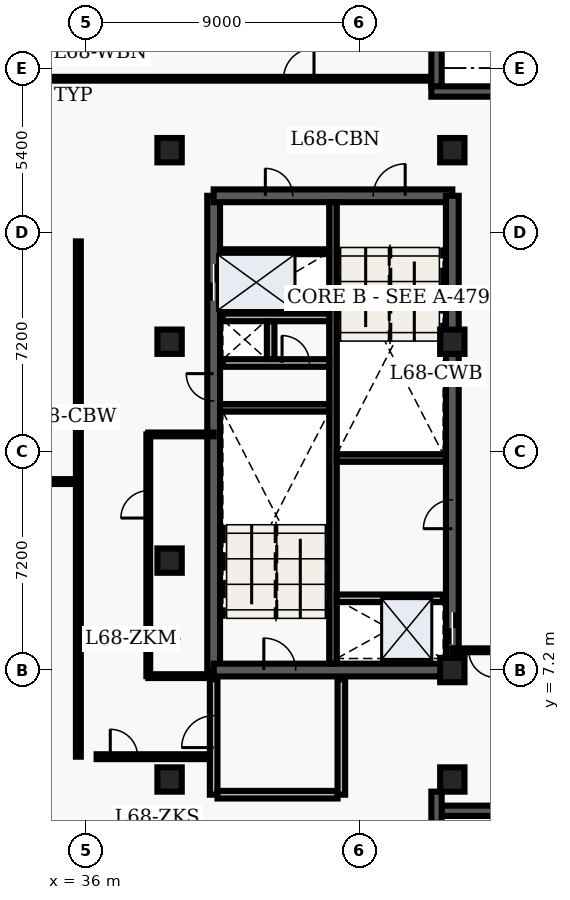
"""IFC4 building model, lengths in metres.
Left out: names, types, materials, properties, quantities, classifications, styles, units other than length and angle.
Written with IfcOpenShell. Run it as: python <this file> out.ifc"""

import sys

from ifc_helpers import new_model, entity, si_unit, converted_unit, direction, frame, origin_with_axes, origin_2d_with_axis, place, context, subcontext, project, spatial, polyline, rectangle, outline, extrude, element, fill, save


model = new_model("IFC4")
c1 = context("Model", 3, precision=1e-05, world=origin_with_axes(), true_north=direction((0.0, 1.0)))
c2 = subcontext(c1, "Body", "Model", "MODEL_VIEW")
j1 = project(units=[si_unit("LENGTHUNIT", "METRE"), converted_unit("PLANEANGLEUNIT", "DEGREE", entity("IfcPlaneAngleMeasure", 0.017), si_unit("PLANEANGLEUNIT", "RADIAN"), dimensions=[0, 0, 0, 0, 0, 0, 0])], contexts=[c1])
p1 = place(None, origin_with_axes())
s1 = spatial("IfcSite", under=j1, at=p1, CompositionType="ELEMENT")
p2 = place(p1, origin_with_axes())
s2 = spatial("IfcBuilding", under=s1, at=p2, CompositionType="ELEMENT")
p3 = place(p2, frame((0.0, 0.0, 276.3), z_axis=(0.0, 0.0, 1.0), x_axis=(1.0, 0.0, 0.0)))
s3 = spatial("IfcBuildingStorey", under=s2, at=p3, CompositionType="ELEMENT", Elevation=276.3)
p4 = place(p3, frame((40.2, 7.2, 0.0), z_axis=(0.0, 0.0, 1.0), x_axis=(0.0, 1.0, 0.0)))
e1 = element("IfcWall", 1, at=p4, inside=s3, PredefinedType="SHEAR", context=c2, shape_type="SweptSolid", body=[
    extrude(outline(polyline([(0.0, -0.21), (15.6, -0.21), (15.6, 0.21), (0.0, 0.21), (0.0, -0.21)])), origin_with_axes(), (0.0, 0.0, 1.0), 3.66),
])
p5 = place(p4, frame((12.75, 0.0, 0.0), z_axis=(0.0, 0.0, 1.0), x_axis=(1.0, 0.0, 0.0)))
e2 = element("IfcOpeningElement", 2, at=p5, cuts=e1, PredefinedType="OPENING", context=c2, shape_type="SweptSolid", body=[
    extrude(rectangle(XDim=1.2, YDim=0.44, at=origin_2d_with_axis()), origin_with_axes(), (0.0, 0.0, 1.0), 2.15),
])
p6 = place(p4, frame((9.3, 0.0, 0.0), z_axis=(0.0, 0.0, 1.0), x_axis=(1.0, 0.0, 0.0)))
e3 = element("IfcOpeningElement", 3, at=p6, cuts=e1, PredefinedType="OPENING", context=c2, shape_type="SweptSolid", body=[
    extrude(rectangle(XDim=0.9, YDim=0.44, at=origin_2d_with_axis()), origin_with_axes(), (0.0, 0.0, 1.0), 2.15),
])
p7 = place(p3, frame((40.2, 7.2, 0.0), z_axis=(0.0, 0.0, 1.0), x_axis=(1.0, 0.0, 0.0)))
e4 = element("IfcWall", 4, at=p7, inside=s3, PredefinedType="SHEAR", context=c2, shape_type="SweptSolid", body=[
    extrude(outline(polyline([(0.0, -0.21), (7.85, -0.21), (7.85, 0.21), (0.0, 0.21), (0.0, -0.21)])), origin_with_axes(), (0.0, 0.0, 1.0), 3.66),
])
p8 = place(p7, frame((2.175, 0.0, 0.0), z_axis=(0.0, 0.0, 1.0), x_axis=(1.0, 0.0, 0.0)))
e5 = element("IfcOpeningElement", 5, at=p8, cuts=e4, PredefinedType="OPENING", context=c2, shape_type="SweptSolid", body=[
    extrude(rectangle(XDim=1.05, YDim=0.44, at=origin_2d_with_axis()), origin_with_axes(), (0.0, 0.0, 1.0), 2.15),
])
p9 = place(p3, frame((40.2, 22.8, 0.0), z_axis=(0.0, 0.0, 1.0), x_axis=(1.0, 0.0, 0.0)))
e6 = element("IfcWall", 6, at=p9, inside=s3, PredefinedType="SHEAR", context=c2, shape_type="SweptSolid", body=[
    extrude(outline(polyline([(0.0, -0.21), (7.85, -0.21), (7.85, 0.21), (0.0, 0.21), (0.0, -0.21)])), origin_with_axes(), (0.0, 0.0, 1.0), 3.66),
])
p10 = place(p9, frame((5.775, 0.0, 0.0), z_axis=(0.0, 0.0, 1.0), x_axis=(1.0, 0.0, 0.0)))
e7 = element("IfcOpeningElement", 7, at=p10, cuts=e6, PredefinedType="OPENING", context=c2, shape_type="SweptSolid", body=[
    extrude(rectangle(XDim=1.05, YDim=0.44, at=origin_2d_with_axis()), origin_with_axes(), (0.0, 0.0, 1.0), 2.15),
])
p11 = place(p9, frame((2.15, 0.0, 0.0), z_axis=(0.0, 0.0, 1.0), x_axis=(1.0, 0.0, 0.0)))
e8 = element("IfcOpeningElement", 8, at=p11, cuts=e6, PredefinedType="OPENING", context=c2, shape_type="SweptSolid", body=[
    extrude(rectangle(XDim=0.9, YDim=0.44, at=origin_2d_with_axis()), origin_with_axes(), (0.0, 0.0, 1.0), 2.15),
])
p12 = place(p3, frame((48.05, 7.2, 0.0), z_axis=(0.0, 0.0, 1.0), x_axis=(0.0, 1.0, 0.0)))
e9 = element("IfcWall", 9, at=p12, inside=s3, PredefinedType="SHEAR", context=c2, shape_type="SweptSolid", body=[
    extrude(outline(polyline([(0.0, -0.21), (15.6, -0.21), (15.6, 0.21), (0.0, 0.21), (0.0, -0.21)])), origin_with_axes(), (0.0, 0.0, 1.0), 3.66),
])
p13 = place(p12, frame((1.375, 0.0, 0.0), z_axis=(0.0, 0.0, 1.0), x_axis=(1.0, 0.0, 0.0)))
e10 = element("IfcOpeningElement", 10, at=p13, cuts=e9, PredefinedType="OPENING", context=c2, shape_type="SweptSolid", body=[
    extrude(rectangle(XDim=1.05, YDim=0.44, at=origin_2d_with_axis()), origin_with_axes(), (0.0, 0.0, 1.0), 2.15),
])
p14 = place(p12, frame((5.125, 0.0, 0.0), z_axis=(0.0, 0.0, 1.0), x_axis=(1.0, 0.0, 0.0)))
e11 = element("IfcOpeningElement", 11, at=p14, cuts=e9, PredefinedType="OPENING", context=c2, shape_type="SweptSolid", body=[
    extrude(rectangle(XDim=0.95, YDim=0.44, at=origin_2d_with_axis()), origin_with_axes(), (0.0, 0.0, 1.0), 2.15),
])
p15 = place(p3, frame((44.125, 7.41, 0.0), z_axis=(0.0, 0.0, 1.0), x_axis=(0.0, 1.0, 0.0)))
e12 = element("IfcWall", 12, at=p15, inside=s3, PredefinedType="SHEAR", context=c2, shape_type="SweptSolid", body=[
    extrude(outline(polyline([(0.0, -0.125), (15.18, -0.125), (15.18, 0.125), (0.0, 0.125), (0.0, -0.125)])), origin_with_axes(), (0.0, 0.0, 1.0), 3.66),
])
for number, where, z_axis, x_axis in (
    (13, (40.41, 15.825, 0.0), (0.0, 0.0, 1.0), (1.0, 0.0, 0.0)),
    (14, (44.25, 14.175, 0.0), (0.0, 0.0, 1.0), (1.0, 0.0, 0.0)),
):
    element("IfcWall", number, at=place(p3, frame(where, z_axis=z_axis, x_axis=x_axis)), inside=s3, PredefinedType="SHEAR", context=c2, shape_type="SweptSolid", body=[
        extrude(outline(polyline([(0.0, -0.125), (3.59, -0.125), (3.59, 0.125), (0.0, 0.125), (0.0, -0.125)])), origin_with_axes(), (0.0, 0.0, 1.0), 3.66),
    ])
p16 = place(p3, frame((40.5, 17.3, 0.0), z_axis=(0.0, 0.0, 1.0), x_axis=(1.0, 0.0, 0.0)))
e15 = element("IfcWall", 15, at=p16, inside=s3, PredefinedType="SOLIDWALL", context=c2, shape_type="SweptSolid", body=[
    extrude(outline(polyline([(0.0, -0.125), (3.5, -0.125), (3.5, 0.125), (0.0, 0.125), (0.0, -0.125)])), origin_with_axes(), (0.0, 0.0, 1.0), 2.7),
])
p17 = place(p16, frame((2.4, 0.0, 0.0), z_axis=(0.0, 0.0, 1.0), x_axis=(1.0, 0.0, 0.0)))
e16 = element("IfcOpeningElement", 16, at=p17, cuts=e15, PredefinedType="OPENING", context=c2, shape_type="SweptSolid", body=[
    extrude(rectangle(XDim=0.9, YDim=0.27, at=origin_2d_with_axis()), origin_with_axes(), (0.0, 0.0, 1.0), 2.15),
])
p18 = place(p3, frame((40.5, 18.8, 0.0), z_axis=(0.0, 0.0, 1.0), x_axis=(1.0, 0.0, 0.0)))
e17 = element("IfcWall", 17, at=p18, inside=s3, PredefinedType="SOLIDWALL", context=c2, shape_type="SweptSolid", body=[
    extrude(outline(polyline([(0.0, -0.125), (3.5, -0.125), (3.5, 0.125), (0.0, 0.125), (0.0, -0.125)])), origin_with_axes(), (0.0, 0.0, 1.0), 2.7),
])
p19 = place(p3, frame((42.075, 17.43, 0.0), z_axis=(0.0, 0.0, 1.0), x_axis=(0.0, 1.0, 0.0)))
e18 = element("IfcWall", 18, at=p19, inside=s3, PredefinedType="SOLIDWALL", context=c2, shape_type="SweptSolid", body=[
    extrude(outline(polyline([(0.0, -0.125), (1.24, -0.125), (1.24, 0.125), (0.0, 0.125), (0.0, -0.125)])), origin_with_axes(), (0.0, 0.0, 1.0), 2.7),
])
p20 = place(p3, frame((40.2, 3.1, 0.0), z_axis=(0.0, 0.0, 1.0), x_axis=(0.0, 1.0, 0.0)))
e19 = element("IfcWall", 19, at=p20, inside=s3, PredefinedType="SOLIDWALL", context=c2, shape_type="SweptSolid", body=[
    extrude(outline(polyline([(0.0, -0.125), (3.8, -0.125), (3.8, 0.125), (0.0, 0.125), (0.0, -0.125)])), origin_with_axes(), (0.0, 0.0, 1.0), 2.7),
])
p21 = place(p20, frame((2.075, 0.0, 0.0), z_axis=(0.0, 0.0, 1.0), x_axis=(1.0, 0.0, 0.0)))
e20 = element("IfcOpeningElement", 20, at=p21, cuts=e19, PredefinedType="OPENING", context=c2, shape_type="SweptSolid", body=[
    extrude(rectangle(XDim=1.05, YDim=0.27, at=origin_2d_with_axis()), origin_with_axes(), (0.0, 0.0, 1.0), 2.15),
])
p22 = place(p3, frame((40.325, 3.1, 0.0), z_axis=(0.0, 0.0, 1.0), x_axis=(1.0, 0.0, 0.0)))
e21 = element("IfcWall", 21, at=p22, inside=s3, PredefinedType="SOLIDWALL", context=c2, shape_type="SweptSolid", body=[
    extrude(outline(polyline([(0.0, -0.125), (3.95, -0.125), (3.95, 0.125), (0.0, 0.125), (0.0, -0.125)])), origin_with_axes(), (0.0, 0.0, 1.0), 2.7),
])
p23 = place(p3, frame((44.4, 3.1, 0.0), z_axis=(0.0, 0.0, 1.0), x_axis=(0.0, 1.0, 0.0)))
e22 = element("IfcWall", 22, at=p23, inside=s3, PredefinedType="SOLIDWALL", context=c2, shape_type="SweptSolid", body=[
    extrude(outline(polyline([(0.0, -0.125), (3.8, -0.125), (3.8, 0.125), (0.0, 0.125), (0.0, -0.125)])), origin_with_axes(), (0.0, 0.0, 1.0), 2.7),
])
for number, where, z_axis, x_axis in (
    (23, (38.75, 3.6, 0.0), (0.0, 0.0, 1.0), (1.0, 0.0, 0.0)),
    (24, (38.75, 10.8, 0.0), (0.0, 0.0, 1.0), (1.0, 0.0, 0.0)),
    (25, (38.75, 18.0, 0.0), (0.0, 0.0, 1.0), (1.0, 0.0, 0.0)),
    (26, (38.75, 24.3, 0.0), (0.0, 0.0, 1.0), (1.0, 0.0, 0.0)),
    (27, (48.05, 3.6, 0.0), (0.0, 0.0, 1.0), (1.0, 0.0, 0.0)),
    (28, (48.05, 7.2, 0.0), (0.0, 0.0, 1.0), (1.0, 0.0, 0.0)),
    (29, (48.05, 18.0, 0.0), (0.0, 0.0, 1.0), (1.0, 0.0, 0.0)),
    (30, (48.05, 24.3, 0.0), (0.0, 0.0, 1.0), (1.0, 0.0, 0.0)),
):
    element("IfcColumn", number, at=place(p3, frame(where, z_axis=z_axis, x_axis=x_axis)), inside=s3, PredefinedType="COLUMN", context=c2, shape_type="SweptSolid", body=[
        extrude(rectangle(XDim=0.8, YDim=0.8, at=origin_2d_with_axis()), origin_with_axes(), (0.0, 0.0, 1.0), 3.9),
    ])
p24 = place(p3, frame((40.5, 20.96, 0.0), z_axis=(0.0, 0.0, 1.0), x_axis=(1.0, 0.0, 0.0)))
e31 = element("IfcWall", 31, at=p24, inside=s3, PredefinedType="PARTITIONING", context=c2, shape_type="SweptSolid", body=[
    extrude(outline(polyline([(0.0, -0.08), (3.5, -0.08), (3.5, 0.08), (0.0, 0.08), (0.0, -0.08)])), origin_with_axes(), (0.0, 0.0, 1.0), 2.7),
])
p25 = place(p3, frame((44.25, 9.56, 0.0), z_axis=(0.0, 0.0, 1.0), x_axis=(1.0, 0.0, 0.0)))
e32 = element("IfcWall", 32, at=p25, inside=s3, PredefinedType="SOLIDWALL", context=c2, shape_type="SweptSolid", body=[
    extrude(outline(polyline([(0.0, -0.125), (3.5, -0.125), (3.5, 0.125), (0.0, 0.125), (0.0, -0.125)])), origin_with_axes(), (0.0, 0.0, 1.0), 2.7),
])
p26 = place(p3, frame((20.3, 13.4, 0.0), z_axis=(0.0, 0.0, 1.0), x_axis=(1.0, 0.0, 0.0)))
e33 = element("IfcWall", 33, at=p26, inside=s3, PredefinedType="PARTITIONING", context=c2, shape_type="SweptSolid", body=[
    extrude(outline(polyline([(0.0, -0.08), (15.45, -0.08), (15.45, 0.08), (0.0, 0.08), (0.0, -0.08)])), origin_with_axes(), (0.0, 0.0, 1.0), 2.7),
])
p27 = place(p26, frame((2.34, 0.0, 0.0), z_axis=(0.0, 0.0, 1.0), x_axis=(1.0, 0.0, 0.0)))
e34 = element("IfcOpeningElement", 34, at=p27, cuts=e33, PredefinedType="OPENING", context=c2, shape_type="SweptSolid", body=[
    extrude(rectangle(XDim=1.0, YDim=0.18, at=origin_2d_with_axis()), origin_with_axes(), (0.0, 0.0, 1.0), 2.15),
])
p28 = place(p26, frame((7.011, 0.0, 0.0), z_axis=(0.0, 0.0, 1.0), x_axis=(1.0, 0.0, 0.0)))
e35 = element("IfcOpeningElement", 35, at=p28, cuts=e33, PredefinedType="OPENING", context=c2, shape_type="SweptSolid", body=[
    extrude(rectangle(XDim=1.0, YDim=0.18, at=origin_2d_with_axis()), origin_with_axes(), (0.0, 0.0, 1.0), 2.15),
])
p29 = place(p26, frame((12.445, 0.0, 0.0), z_axis=(0.0, 0.0, 1.0), x_axis=(1.0, 0.0, 0.0)))
e36 = element("IfcOpeningElement", 36, at=p29, cuts=e33, PredefinedType="OPENING", context=c2, shape_type="SweptSolid", body=[
    extrude(rectangle(XDim=1.2, YDim=0.18, at=origin_2d_with_axis()), origin_with_axes(), (0.0, 0.0, 1.0), 2.2),
])
p30 = place(p3, frame((20.3, 15.7, 0.0), z_axis=(0.0, 0.0, 1.0), x_axis=(1.0, 0.0, 0.0)))
e37 = element("IfcWall", 37, at=p30, inside=s3, PredefinedType="PARTITIONING", context=c2, shape_type="SweptSolid", body=[
    extrude(outline(polyline([(0.0, -0.08), (15.45, -0.08), (15.45, 0.08), (0.0, 0.08), (0.0, -0.08)])), origin_with_axes(), (0.0, 0.0, 1.0), 2.7),
])
p31 = place(p30, frame((7.775, 0.0, 0.0), z_axis=(0.0, 0.0, 1.0), x_axis=(1.0, 0.0, 0.0)))
e38 = element("IfcOpeningElement", 38, at=p31, cuts=e37, PredefinedType="OPENING", context=c2, shape_type="SweptSolid", body=[
    extrude(rectangle(XDim=1.0, YDim=0.18, at=origin_2d_with_axis()), origin_with_axes(), (0.0, 0.0, 1.0), 2.15),
])
p32 = place(p3, frame((35.75, 4.35, 0.0), z_axis=(0.0, 0.0, 1.0), x_axis=(0.0, 1.0, 0.0)))
e39 = element("IfcWall", 39, at=p32, inside=s3, PredefinedType="PARTITIONING", context=c2, shape_type="SweptSolid", body=[
    extrude(outline(polyline([(0.0, -0.08), (16.95, -0.08), (16.95, 0.08), (0.0, 0.08), (0.0, -0.08)])), origin_with_axes(), (0.0, 0.0, 1.0), 2.7),
])
p33 = place(p3, frame((49.765, 7.85, 0.0), z_axis=(0.0, 0.0, 1.0), x_axis=(-1.0, 0.0, 0.0)))
e40 = element("IfcWall", 40, at=p33, inside=s3, PredefinedType="PARTITIONING", context=c2, shape_type="SweptSolid", body=[
    extrude(outline(polyline([(0.0, -0.062), (1.715, -0.062), (1.715, 0.062), (0.0, 0.062), (0.0, -0.062)])), origin_with_axes(), (0.0, 0.0, 1.0), 2.7),
])
p34 = place(p33, frame((0.725, 0.0, 0.0), z_axis=(0.0, 0.0, 1.0), x_axis=(1.0, 0.0, 0.0)))
e41 = element("IfcOpeningElement", 41, at=p34, cuts=e40, PredefinedType="OPENING", context=c2, shape_type="SweptSolid", body=[
    extrude(rectangle(XDim=0.9, YDim=0.145, at=origin_2d_with_axis()), origin_with_axes(), (0.0, 0.0, 1.0), 2.15),
])
p35 = place(p3, frame((34.535, 26.65, 0.0), z_axis=(0.0, 0.0, 1.0), x_axis=(1.0, 0.0, 0.0)))
e42 = element("IfcWall", 42, at=p35, inside=s3, PredefinedType="PARTITIONING", context=c2, shape_type="SweptSolid", body=[
    extrude(outline(polyline([(0.0, -0.062), (12.995, -0.062), (12.995, 0.062), (0.0, 0.062), (0.0, -0.062)])), origin_with_axes(), (0.0, 0.0, 1.0), 2.7),
])
p36 = place(p35, frame((8.465, 0.0, 0.0), z_axis=(0.0, 0.0, 1.0), x_axis=(1.0, 0.0, 0.0)))
e43 = element("IfcOpeningElement", 43, at=p36, cuts=e42, PredefinedType="OPENING", context=c2, shape_type="SweptSolid", body=[
    extrude(rectangle(XDim=1.0, YDim=0.145, at=origin_2d_with_axis()), origin_with_axes(), (0.0, 0.0, 1.0), 2.15),
])
p37 = place(p3, frame((36.35, 4.35, 0.0), z_axis=(0.0, 0.0, 1.0), x_axis=(1.0, 0.0, 0.0)))
e44 = element("IfcWall", 44, at=p37, inside=s3, PredefinedType="PARTITIONING", context=c2, shape_type="SweptSolid", body=[
    extrude(outline(polyline([(0.0, -0.08), (3.725, -0.08), (3.725, 0.08), (0.0, 0.08), (0.0, -0.08)])), origin_with_axes(), (0.0, 0.0, 1.0), 2.7),
])
p38 = place(p37, frame((0.9, 0.0, 0.0), z_axis=(0.0, 0.0, 1.0), x_axis=(1.0, 0.0, 0.0)))
e45 = element("IfcOpeningElement", 45, at=p38, cuts=e44, PredefinedType="OPENING", context=c2, shape_type="SweptSolid", body=[
    extrude(rectangle(XDim=0.9, YDim=0.18, at=origin_2d_with_axis()), origin_with_axes(), (0.0, 0.0, 1.0), 2.15),
])
for number, where, z_axis, x_axis in (
    (46, (38.05, 7.0, 0.0), (0.0, 0.0, 1.0), (1.0, 0.0, 0.0)),
    (47, (38.05, 14.95, 0.0), (0.0, 0.0, 1.0), (1.0, 0.0, 0.0)),
):
    element("IfcWall", number, at=place(p3, frame(where, z_axis=z_axis, x_axis=x_axis)), inside=s3, PredefinedType="PARTITIONING", context=c2, shape_type="SweptSolid", body=[
        extrude(outline(polyline([(0.0, -0.062), (2.15, -0.062), (2.15, 0.062), (0.0, 0.062), (0.0, -0.062)])), origin_with_axes(), (0.0, 0.0, 1.0), 2.7),
    ])
p39 = place(p3, frame((38.05, 7.0, 0.0), z_axis=(0.0, 0.0, 1.0), x_axis=(0.0, 1.0, 0.0)))
e48 = element("IfcWall", 48, at=p39, inside=s3, PredefinedType="PARTITIONING", context=c2, shape_type="SweptSolid", body=[
    extrude(outline(polyline([(0.0, -0.062), (7.95, -0.062), (7.95, 0.062), (0.0, 0.062), (0.0, -0.062)])), origin_with_axes(), (0.0, 0.0, 1.0), 2.7),
])
p40 = place(p39, frame((5.65, 0.0, 0.0), z_axis=(0.0, 0.0, 1.0), x_axis=(1.0, 0.0, 0.0)))
e49 = element("IfcOpeningElement", 49, at=p40, cuts=e48, PredefinedType="OPENING", context=c2, shape_type="SweptSolid", body=[
    extrude(rectangle(XDim=0.9, YDim=0.145, at=origin_2d_with_axis()), origin_with_axes(), (0.0, 0.0, 1.0), 2.15),
])
p41 = place(p3, frame((47.53, 28.46, 0.0), z_axis=(0.0, 0.0, 1.0), x_axis=(0.0, -1.0, 0.0)))
e50 = element("IfcWall", 50, at=p41, inside=s3, PredefinedType="SOLIDWALL", context=c2, shape_type="SweptSolid", body=[
    extrude(outline(polyline([(0.0, -0.17), (2.06, -0.17), (2.06, 0.17), (0.0, 0.17), (0.0, -0.17)])), origin_with_axes(), (0.0, 0.0, 1.0), 3.66),
])
p42 = place(p3, frame((47.36, 26.23, 0.0), z_axis=(0.0, 0.0, 1.0), x_axis=(1.0, 0.0, 0.0)))
e51 = element("IfcWall", 51, at=p42, inside=s3, PredefinedType="SOLIDWALL", context=c2, shape_type="SweptSolid", body=[
    extrude(outline(polyline([(0.0, -0.17), (2.74, -0.17), (2.74, 0.17), (0.0, 0.17), (0.0, -0.17)])), origin_with_axes(), (0.0, 0.0, 1.0), 3.66),
])
p43 = place(p3, frame((49.76, 2.57, 0.0), z_axis=(0.0, 0.0, 1.0), x_axis=(-1.0, 0.0, 0.0)))
e52 = element("IfcWall", 52, at=p43, inside=s3, PredefinedType="SOLIDWALL", context=c2, shape_type="SweptSolid", body=[
    extrude(outline(polyline([(0.0, -0.17), (2.06, -0.17), (2.06, 0.17), (0.0, 0.17), (0.0, -0.17)])), origin_with_axes(), (0.0, 0.0, 1.0), 3.66),
])
p44 = place(p3, frame((47.53, 3.2, 0.0), z_axis=(0.0, 0.0, 1.0), x_axis=(0.0, -1.0, 0.0)))
e53 = element("IfcWall", 53, at=p44, inside=s3, PredefinedType="SOLIDWALL", context=c2, shape_type="SweptSolid", body=[
    extrude(outline(polyline([(0.0, -0.17), (3.2, -0.17), (3.2, 0.17), (0.0, 0.17), (0.0, -0.17)])), origin_with_axes(), (0.0, 0.0, 1.0), 3.66),
])
p45 = place(p12, frame((1.375, 0.0, 0.0), z_axis=(0.0, 0.0, 1.0), x_axis=(1.0, 0.0, 0.0)))
e54 = element("IfcDoor", 54, at=p45, inside=s3, OperationType="SLIDING_TO_LEFT", PredefinedType="DOOR", context=c2, shape_type="SweptSolid", body=[
    extrude(rectangle(XDim=1.05, YDim=0.09, at=origin_2d_with_axis()), origin_with_axes(), (0.0, 0.0, 1.0), 2.15),
])
fill(e10, e54)
p46 = place(p4, frame((12.75, 0.0, 0.0), z_axis=(0.0, 0.0, 1.0), x_axis=(1.0, 0.0, 0.0)))
e55 = element("IfcDoor", 55, at=p46, inside=s3, OperationType="DOUBLE_DOOR_SLIDING", PredefinedType="DOOR", context=c2, shape_type="SweptSolid", body=[
    extrude(rectangle(XDim=1.2, YDim=0.09, at=origin_2d_with_axis()), origin_with_axes(), (0.0, 0.0, 1.0), 2.15),
])
fill(e2, e55)
p47 = place(p4, frame((9.3, 0.0, 0.0), z_axis=(0.0, 0.0, 1.0), x_axis=(1.0, 0.0, 0.0)))
e56 = element("IfcDoor", 56, at=p47, inside=s3, OperationType="SINGLE_SWING_RIGHT", PredefinedType="DOOR", context=c2, shape_type="SweptSolid", body=[
    extrude(rectangle(XDim=0.9, YDim=0.09, at=origin_2d_with_axis()), origin_with_axes(), (0.0, 0.0, 1.0), 2.15),
])
fill(e3, e56)
p48 = place(p16, frame((2.4, 0.0, 0.0), z_axis=(0.0, 0.0, 1.0), x_axis=(1.0, 0.0, 0.0)))
e57 = element("IfcDoor", 57, at=p48, inside=s3, OperationType="SINGLE_SWING_LEFT", PredefinedType="DOOR", context=c2, shape_type="SweptSolid", body=[
    extrude(rectangle(XDim=0.9, YDim=0.09, at=origin_2d_with_axis()), origin_with_axes(), (0.0, 0.0, 1.0), 2.15),
])
fill(e16, e57)
p49 = place(p7, frame((2.175, 0.0, 0.0), z_axis=(0.0, 0.0, 1.0), x_axis=(1.0, 0.0, 0.0)))
e58 = element("IfcDoor", 58, at=p49, inside=s3, OperationType="SINGLE_SWING_LEFT", PredefinedType="DOOR", context=c2, shape_type="SweptSolid", body=[
    extrude(rectangle(XDim=1.05, YDim=0.09, at=origin_2d_with_axis()), origin_with_axes(), (0.0, 0.0, 1.0), 2.15),
])
fill(e5, e58)
p50 = place(p9, frame((5.775, 0.0, 0.0), z_axis=(0.0, 0.0, 1.0), x_axis=(1.0, 0.0, 0.0)))
e59 = element("IfcDoor", 59, at=p50, inside=s3, OperationType="SINGLE_SWING_RIGHT", PredefinedType="DOOR", context=c2, shape_type="SweptSolid", body=[
    extrude(rectangle(XDim=1.05, YDim=0.09, at=origin_2d_with_axis()), origin_with_axes(), (0.0, 0.0, 1.0), 2.15),
])
fill(e7, e59)
p51 = place(p20, frame((2.075, 0.0, 0.0), z_axis=(0.0, 0.0, 1.0), x_axis=(1.0, 0.0, 0.0)))
e60 = element("IfcDoor", 60, at=p51, inside=s3, OperationType="SINGLE_SWING_LEFT", PredefinedType="DOOR", context=c2, shape_type="SweptSolid", body=[
    extrude(rectangle(XDim=1.05, YDim=0.09, at=origin_2d_with_axis()), origin_with_axes(), (0.0, 0.0, 1.0), 2.15),
])
fill(e20, e60)
p52 = place(p9, frame((2.15, 0.0, 0.0), z_axis=(0.0, 0.0, 1.0), x_axis=(1.0, 0.0, 0.0)))
e61 = element("IfcDoor", 61, at=p52, inside=s3, OperationType="SINGLE_SWING_LEFT", PredefinedType="DOOR", context=c2, shape_type="SweptSolid", body=[
    extrude(rectangle(XDim=0.9, YDim=0.09, at=origin_2d_with_axis()), origin_with_axes(), (0.0, 0.0, 1.0), 2.15),
])
fill(e8, e61)
p53 = place(p12, frame((5.125, 0.0, 0.0), z_axis=(0.0, 0.0, 1.0), x_axis=(1.0, 0.0, 0.0)))
e62 = element("IfcDoor", 62, at=p53, inside=s3, OperationType="SINGLE_SWING_LEFT", PredefinedType="DOOR", context=c2, shape_type="SweptSolid", body=[
    extrude(rectangle(XDim=0.95, YDim=0.09, at=origin_2d_with_axis()), origin_with_axes(), (0.0, 0.0, 1.0), 2.15),
])
fill(e11, e62)
p54 = place(p33, frame((0.725, 0.0, 0.0), z_axis=(0.0, 0.0, 1.0), x_axis=(1.0, 0.0, 0.0)))
e63 = element("IfcDoor", 63, at=p54, inside=s3, OperationType="SINGLE_SWING_LEFT", PredefinedType="DOOR", context=c2, shape_type="SweptSolid", body=[
    extrude(rectangle(XDim=0.9, YDim=0.075, at=origin_2d_with_axis()), origin_with_axes(), (0.0, 0.0, 1.0), 2.15),
])
fill(e41, e63)
p55 = place(p35, frame((8.465, 0.0, 0.0), z_axis=(0.0, 0.0, 1.0), x_axis=(1.0, 0.0, 0.0)))
e64 = element("IfcDoor", 64, at=p55, inside=s3, OperationType="SINGLE_SWING_RIGHT", PredefinedType="DOOR", context=c2, shape_type="SweptSolid", body=[
    extrude(rectangle(XDim=1.0, YDim=0.075, at=origin_2d_with_axis()), origin_with_axes(), (0.0, 0.0, 1.0), 2.15),
])
fill(e43, e64)
p56 = place(p37, frame((0.9, 0.0, 0.0), z_axis=(0.0, 0.0, 1.0), x_axis=(1.0, 0.0, 0.0)))
e65 = element("IfcDoor", 65, at=p56, inside=s3, OperationType="SINGLE_SWING_LEFT", PredefinedType="DOOR", context=c2, shape_type="SweptSolid", body=[
    extrude(rectangle(XDim=0.9, YDim=0.09, at=origin_2d_with_axis()), origin_with_axes(), (0.0, 0.0, 1.0), 2.15),
])
fill(e45, e65)
p57 = place(p39, frame((5.65, 0.0, 0.0), z_axis=(0.0, 0.0, 1.0), x_axis=(1.0, 0.0, 0.0)))
e66 = element("IfcDoor", 66, at=p57, inside=s3, OperationType="SINGLE_SWING_LEFT", PredefinedType="DOOR", context=c2, shape_type="SweptSolid", body=[
    extrude(rectangle(XDim=0.9, YDim=0.075, at=origin_2d_with_axis()), origin_with_axes(), (0.0, 0.0, 1.0), 2.15),
])
fill(e49, e66)
save(model, sys.argv[1])
